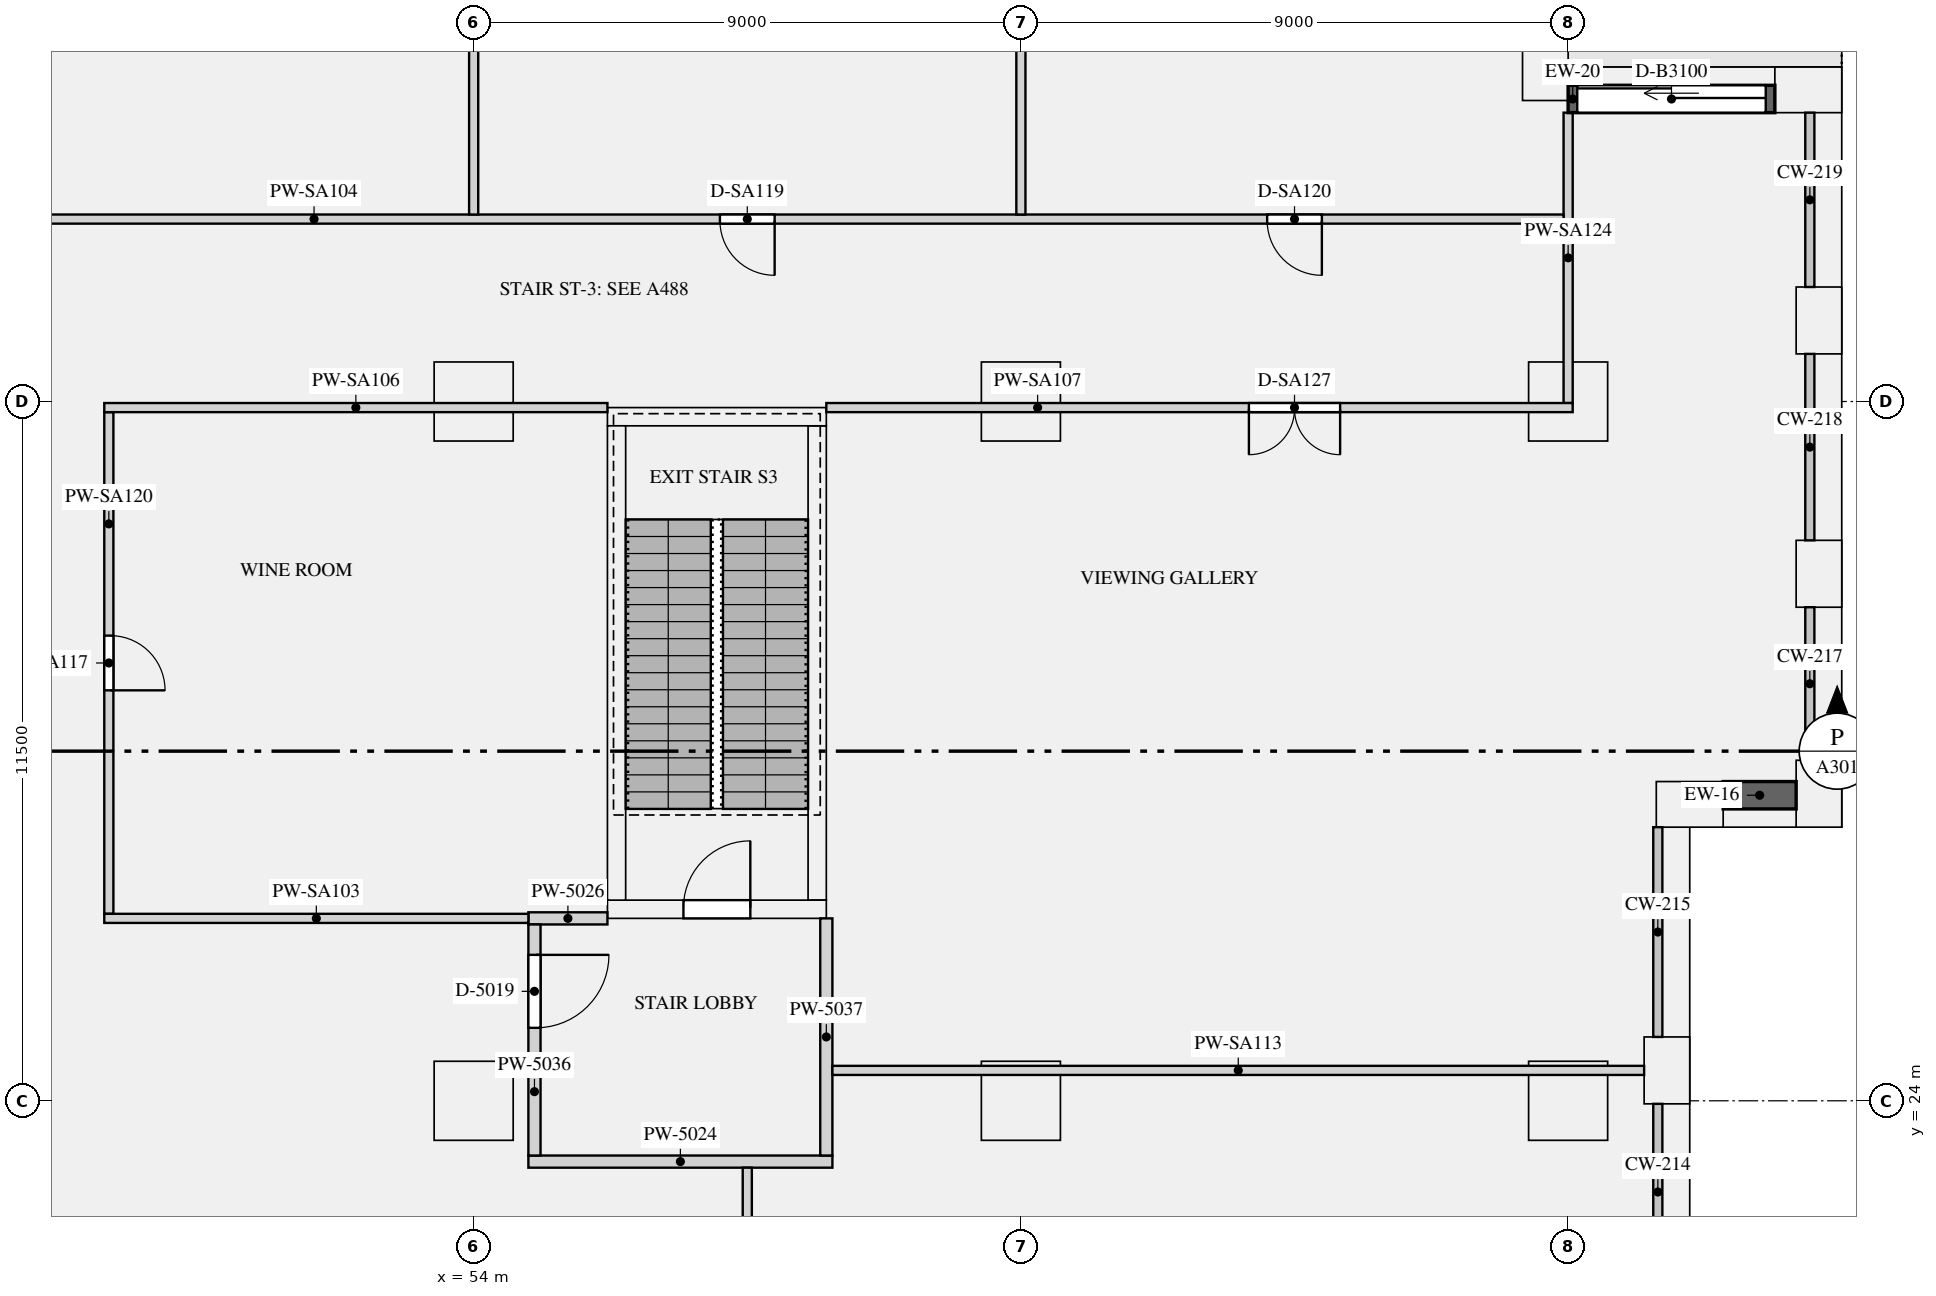
"""IFC4 building model, lengths in metres.
Left out: names, types, materials, properties, quantities, classifications, styles, units other than length and angle.
Written with IfcOpenShell. Run it as: python <this file> out.ifc"""

import sys

from ifc_helpers import new_model, si_unit, direction, frame, frame_2d, origin, origin_2d, place, context, subcontext, project, spatial, rectangle, extrude, element, fill, save


model = new_model("IFC4")
c1 = context("Model", 3, precision=1e-05, world=origin(), true_north=direction((0.0, 1.0)))
c2 = subcontext(c1, "Body", "Model", "MODEL_VIEW")
j1 = project(units=[si_unit("LENGTHUNIT", "METRE"), si_unit("PLANEANGLEUNIT", "RADIAN")], contexts=[c1])
p1 = place(None, origin())
s1 = spatial("IfcSite", under=j1, at=p1, CompositionType="ELEMENT")
p2 = place(p1, origin())
s2 = spatial("IfcBuilding", under=s1, at=p2, CompositionType="ELEMENT")
p3 = place(p2, frame((0.0, 0.0, 77.25)))
s3 = spatial("IfcBuildingStorey", under=s2, at=p3, CompositionType="ELEMENT", Elevation=77.25)
for number, where, z_axis, x_axis in (
    (1, (73.625, 24.5, 0.0), (0.0, 0.0, 1.0), (0.0, 1.0, 0.0)),
    (2, (74.0, 28.875, 0.0), (0.0, 0.0, 1.0), (1.0, 0.0, 0.0)),
    (3, (76.125, 29.05, 0.0), (0.0, 0.0, 1.0), (0.0, 1.0, 0.0)),
    (4, (76.125, 32.667, 0.0), (0.0, 0.0, 1.0), (0.0, 1.0, 0.0)),
    (5, (76.125, 36.833, 0.0), (0.0, 0.0, 1.0), (0.0, 1.0, 0.0)),
    (6, (75.95, 40.625, 0.0), (0.0, 0.0, 1.0), (-1.0, 0.0, 0.0)),
    (7, (71.625, 41.0, 0.0), (0.0, 0.0, 1.0), (0.0, 1.0, 0.0)),
):
    element("IfcColumn", number, at=place(p3, frame(where, z_axis=z_axis, x_axis=x_axis)), inside=s3, PredefinedType="USERDEFINED", context=c2, shape_type="SweptSolid", body=[
        extrude(rectangle(XDim=1.1, YDim=0.75, at=origin_2d()), origin(), (0.0, 0.0, 1.0), 6.3),
    ])
for number, where, z_axis, x_axis in (
    (8, (54.0, 24.0, 0.0), (0.0, 0.0, 1.0), (1.0, 0.0, 0.0)),
    (9, (63.0, 24.0, 0.0), (0.0, 0.0, 1.0), (1.0, 0.0, 0.0)),
    (10, (72.0, 24.0, 0.0), (0.0, 0.0, 1.0), (1.0, 0.0, 0.0)),
    (11, (54.0, 35.5, 0.0), (0.0, 0.0, 1.0), (1.0, 0.0, 0.0)),
    (12, (63.0, 35.5, 0.0), (0.0, 0.0, 1.0), (1.0, 0.0, 0.0)),
    (13, (72.0, 35.5, 0.0), (0.0, 0.0, 1.0), (1.0, 0.0, 0.0)),
):
    element("IfcColumn", number, at=place(p3, frame(where, z_axis=z_axis, x_axis=x_axis)), inside=s3, PredefinedType="COLUMN", context=c2, shape_type="SweptSolid", body=[
        extrude(rectangle(XDim=1.3, YDim=1.3, at=origin_2d()), origin(), (0.0, 0.0, 1.0), 6.3),
    ])
p4 = place(p3, frame((56.2, 27.15, 0.0), z_axis=(0.0, 0.0, 1.0), x_axis=(1.0, 0.0, 0.0)))
e14 = element("IfcWall", 14, at=p4, inside=s3, PredefinedType="SHEAR", context=c2, shape_type="SweptSolid", body=[
    extrude(rectangle(XDim=3.6, YDim=0.3, at=frame_2d((1.8, 0.0))), origin(), (0.0, 0.0, 1.0), 6.3),
])
p5 = place(p4, frame((1.25, 0.0, 0.0)))
e15 = element("IfcOpeningElement", 15, at=p5, cuts=e14, PredefinedType="OPENING", context=c2, shape_type="SweptSolid", body=[
    extrude(rectangle(XDim=1.1, YDim=2.1, at=frame_2d((0.55, 1.05))), frame((0.0, 0.16, 0.0), z_axis=(0.0, -1.0, 0.0), x_axis=(1.0, 0.0, 0.0)), (0.0, 0.0, 1.0), 0.32),
])
p6 = place(p3, frame((56.2, 35.25, 0.0), z_axis=(0.0, 0.0, 1.0), x_axis=(1.0, 0.0, 0.0)))
e16 = element("IfcWall", 16, at=p6, inside=s3, PredefinedType="SHEAR", context=c2, shape_type="SweptSolid", body=[
    extrude(rectangle(XDim=3.6, YDim=0.3, at=frame_2d((1.8, 0.0))), origin(), (0.0, 0.0, 1.0), 6.3),
])
for number, where, z_axis, x_axis in (
    (17, (56.35, 27.3, 0.0), (0.0, 0.0, 1.0), (0.0, 1.0, 0.0)),
    (18, (59.65, 27.3, 0.0), (0.0, 0.0, 1.0), (0.0, 1.0, 0.0)),
):
    element("IfcWall", number, at=place(p3, frame(where, z_axis=z_axis, x_axis=x_axis)), inside=s3, PredefinedType="SHEAR", context=c2, shape_type="SweptSolid", body=[
        extrude(rectangle(XDim=7.8, YDim=0.3, at=frame_2d((3.9, 0.0))), origin(), (0.0, 0.0, 1.0), 6.3),
    ])
p7 = place(p3, frame((74.55, 29.025, 0.9), z_axis=(0.0, 0.0, 1.0), x_axis=(1.0, 0.0, 0.0)))
e19 = element("IfcWall", 19, at=p7, inside=s3, PredefinedType="SOLIDWALL", context=c2, shape_type="SweptSolid", body=[
    extrude(rectangle(XDim=1.2, YDim=0.45, at=frame_2d((0.6, 0.0))), origin(), (0.0, 0.0, 1.0), 5.08),
])
p8 = place(p3, frame((75.4, 40.475, 0.0), z_axis=(0.0, 0.0, 1.0), x_axis=(-1.0, 0.0, 0.0)))
e20 = element("IfcWall", 20, at=p8, inside=s3, PredefinedType="SOLIDWALL", context=c2, shape_type="SweptSolid", body=[
    extrude(rectangle(XDim=3.4, YDim=0.45, at=frame_2d((1.7, 0.0))), origin(), (0.0, 0.0, 1.0), 5.98),
])
p9 = place(p8, frame((0.15, 0.0, 0.0)))
e21 = element("IfcOpeningElement", 21, at=p9, cuts=e20, PredefinedType="OPENING", context=c2, shape_type="SweptSolid", body=[
    extrude(rectangle(XDim=3.1, YDim=2.3, at=frame_2d((1.55, 1.15))), frame((0.0, 0.235, 0.0), z_axis=(0.0, -1.0, 0.0), x_axis=(1.0, 0.0, 0.0)), (0.0, 0.0, 1.0), 0.47),
])
p10 = place(p3, frame((54.9, 23.0, 0.0), z_axis=(0.0, 0.0, 1.0), x_axis=(1.0, 0.0, 0.0)))
e22 = element("IfcWall", 22, at=p10, inside=s3, PredefinedType="PARTITIONING", context=c2, shape_type="SweptSolid", body=[
    extrude(rectangle(XDim=5.0, YDim=0.2, at=frame_2d((2.5, 0.0))), origin(), (0.0, 0.0, 1.0), 5.98),
])
p11 = place(p3, frame((54.9, 27.0, 0.0), z_axis=(0.0, 0.0, 1.0), x_axis=(1.0, 0.0, 0.0)))
e23 = element("IfcWall", 23, at=p11, inside=s3, PredefinedType="PARTITIONING", context=c2, shape_type="SweptSolid", body=[
    extrude(rectangle(XDim=1.3, YDim=0.2, at=frame_2d((0.65, 0.0))), origin(), (0.0, 0.0, 1.0), 5.98),
])
p12 = place(p3, frame((55.0, 23.1, 0.0), z_axis=(0.0, 0.0, 1.0), x_axis=(0.0, 1.0, 0.0)))
e24 = element("IfcWall", 24, at=p12, inside=s3, PredefinedType="PARTITIONING", context=c2, shape_type="SweptSolid", body=[
    extrude(rectangle(XDim=3.8, YDim=0.2, at=frame_2d((1.9, 0.0))), origin(), (0.0, 0.0, 1.0), 5.98),
])
p13 = place(p12, frame((2.1, 0.0, 0.0)))
e25 = element("IfcOpeningElement", 25, at=p13, cuts=e24, PredefinedType="OPENING", context=c2, shape_type="SweptSolid", body=[
    extrude(rectangle(XDim=1.2, YDim=2.1, at=frame_2d((0.6, 1.05))), frame((0.0, 0.11, 0.0), z_axis=(0.0, -1.0, 0.0), x_axis=(1.0, 0.0, 0.0)), (0.0, 0.0, 1.0), 0.22),
])
p14 = place(p3, frame((59.8, 23.1, 0.0), z_axis=(0.0, 0.0, 1.0), x_axis=(0.0, 1.0, 0.0)))
e26 = element("IfcWall", 26, at=p14, inside=s3, PredefinedType="PARTITIONING", context=c2, shape_type="SweptSolid", body=[
    extrude(rectangle(XDim=3.9, YDim=0.2, at=frame_2d((1.95, 0.0))), origin(), (0.0, 0.0, 1.0), 5.98),
])
p15 = place(p3, frame((47.925, 27.0, 0.0), z_axis=(0.0, 0.0, 1.0), x_axis=(1.0, 0.0, 0.0)))
e27 = element("IfcWall", 27, at=p15, inside=s3, PredefinedType="PARTITIONING", context=c2, shape_type="SweptSolid", body=[
    extrude(rectangle(XDim=6.975, YDim=0.15, at=frame_2d((3.487, 0.0))), origin(), (0.0, 0.0, 1.0), 5.98),
])
p16 = place(p3, frame((13.425, 38.5, 0.0), z_axis=(0.0, 0.0, 1.0), x_axis=(1.0, 0.0, 0.0)))
e28 = element("IfcWall", 28, at=p16, inside=s3, PredefinedType="PARTITIONING", context=c2, shape_type="SweptSolid", body=[
    extrude(rectangle(XDim=58.5, YDim=0.15, at=frame_2d((29.25, 0.0))), origin(), (0.0, 0.0, 1.0), 5.98),
])
p17 = place(p16, frame((1.575, 0.0, 0.0)))
e29 = element("IfcOpeningElement", 29, at=p17, cuts=e28, PredefinedType="OPENING", context=c2, shape_type="SweptSolid", body=[
    extrude(rectangle(XDim=1.5, YDim=2.1, at=frame_2d((0.75, 1.05))), frame((0.0, 0.085, 0.0), z_axis=(0.0, -1.0, 0.0), x_axis=(1.0, 0.0, 0.0)), (0.0, 0.0, 1.0), 0.17),
])
p18 = place(p16, frame((6.825, 0.0, 0.0)))
e30 = element("IfcOpeningElement", 30, at=p18, cuts=e28, PredefinedType="OPENING", context=c2, shape_type="SweptSolid", body=[
    extrude(rectangle(XDim=1.5, YDim=2.1, at=frame_2d((0.75, 1.05))), frame((0.0, 0.085, 0.0), z_axis=(0.0, -1.0, 0.0), x_axis=(1.0, 0.0, 0.0)), (0.0, 0.0, 1.0), 0.17),
])
p19 = place(p16, frame((17.625, 0.0, 0.0)))
e31 = element("IfcOpeningElement", 31, at=p19, cuts=e28, PredefinedType="OPENING", context=c2, shape_type="SweptSolid", body=[
    extrude(rectangle(XDim=0.9, YDim=2.1, at=frame_2d((0.45, 1.05))), frame((0.0, 0.085, 0.0), z_axis=(0.0, -1.0, 0.0), x_axis=(1.0, 0.0, 0.0)), (0.0, 0.0, 1.0), 0.17),
])
p20 = place(p16, frame((24.375, 0.0, 0.0)))
e32 = element("IfcOpeningElement", 32, at=p20, cuts=e28, PredefinedType="OPENING", context=c2, shape_type="SweptSolid", body=[
    extrude(rectangle(XDim=0.9, YDim=2.1, at=frame_2d((0.45, 1.05))), frame((0.0, 0.085, 0.0), z_axis=(0.0, -1.0, 0.0), x_axis=(1.0, 0.0, 0.0)), (0.0, 0.0, 1.0), 0.17),
])
p21 = place(p16, frame((30.375, 0.0, 0.0)))
e33 = element("IfcOpeningElement", 33, at=p21, cuts=e28, PredefinedType="OPENING", context=c2, shape_type="SweptSolid", body=[
    extrude(rectangle(XDim=0.9, YDim=2.1, at=frame_2d((0.45, 1.05))), frame((0.0, 0.085, 0.0), z_axis=(0.0, -1.0, 0.0), x_axis=(1.0, 0.0, 0.0)), (0.0, 0.0, 1.0), 0.17),
])
p22 = place(p16, frame((44.625, 0.0, 0.0)))
e34 = element("IfcOpeningElement", 34, at=p22, cuts=e28, PredefinedType="OPENING", context=c2, shape_type="SweptSolid", body=[
    extrude(rectangle(XDim=0.9, YDim=2.1, at=frame_2d((0.45, 1.05))), frame((0.0, 0.085, 0.0), z_axis=(0.0, -1.0, 0.0), x_axis=(1.0, 0.0, 0.0)), (0.0, 0.0, 1.0), 0.17),
])
p23 = place(p16, frame((53.625, 0.0, 0.0)))
e35 = element("IfcOpeningElement", 35, at=p23, cuts=e28, PredefinedType="OPENING", context=c2, shape_type="SweptSolid", body=[
    extrude(rectangle(XDim=0.9, YDim=2.1, at=frame_2d((0.45, 1.05))), frame((0.0, 0.085, 0.0), z_axis=(0.0, -1.0, 0.0), x_axis=(1.0, 0.0, 0.0)), (0.0, 0.0, 1.0), 0.17),
])
p24 = place(p3, frame((47.925, 35.4, 0.0), z_axis=(0.0, 0.0, 1.0), x_axis=(1.0, 0.0, 0.0)))
e36 = element("IfcWall", 36, at=p24, inside=s3, PredefinedType="PARTITIONING", context=c2, shape_type="SweptSolid", body=[
    extrude(rectangle(XDim=8.275, YDim=0.15, at=frame_2d((4.137, 0.0))), origin(), (0.0, 0.0, 1.0), 5.98),
])
p25 = place(p3, frame((59.8, 35.4, 0.0), z_axis=(0.0, 0.0, 1.0), x_axis=(1.0, 0.0, 0.0)))
e37 = element("IfcWall", 37, at=p25, inside=s3, PredefinedType="PARTITIONING", context=c2, shape_type="SweptSolid", body=[
    extrude(rectangle(XDim=12.275, YDim=0.15, at=frame_2d((6.137, 0.0))), origin(), (0.0, 0.0, 1.0), 5.98),
])
p26 = place(p25, frame((6.95, 0.0, 0.0)))
e38 = element("IfcOpeningElement", 38, at=p26, cuts=e37, PredefinedType="OPENING", context=c2, shape_type="SweptSolid", body=[
    extrude(rectangle(XDim=1.5, YDim=2.1, at=frame_2d((0.75, 1.05))), frame((0.0, 0.085, 0.0), z_axis=(0.0, -1.0, 0.0), x_axis=(1.0, 0.0, 0.0)), (0.0, 0.0, 1.0), 0.17),
])
p27 = place(p3, frame((59.9, 24.5, 0.0), z_axis=(0.0, 0.0, 1.0), x_axis=(1.0, 0.0, 0.0)))
e39 = element("IfcWall", 39, at=p27, inside=s3, PredefinedType="PARTITIONING", context=c2, shape_type="SweptSolid", body=[
    extrude(rectangle(XDim=13.35, YDim=0.15, at=frame_2d((6.675, 0.0))), origin(), (0.0, 0.0, 1.0), 5.98),
])
p28 = place(p3, frame((48.0, 27.075, 0.0), z_axis=(0.0, 0.0, 1.0), x_axis=(0.0, 1.0, 0.0)))
e40 = element("IfcWall", 40, at=p28, inside=s3, PredefinedType="PARTITIONING", context=c2, shape_type="SweptSolid", body=[
    extrude(rectangle(XDim=8.25, YDim=0.15, at=frame_2d((4.125, 0.0))), origin(), (0.0, 0.0, 1.0), 5.98),
])
p29 = place(p28, frame((3.675, 0.0, 0.0)))
e41 = element("IfcOpeningElement", 41, at=p29, cuts=e40, PredefinedType="OPENING", context=c2, shape_type="SweptSolid", body=[
    extrude(rectangle(XDim=0.9, YDim=2.1, at=frame_2d((0.45, 1.05))), frame((0.0, 0.085, 0.0), z_axis=(0.0, -1.0, 0.0), x_axis=(1.0, 0.0, 0.0)), (0.0, 0.0, 1.0), 0.17),
])
p30 = place(p3, frame((72.0, 35.475, 0.0), z_axis=(0.0, 0.0, 1.0), x_axis=(0.0, 1.0, 0.0)))
e42 = element("IfcWall", 42, at=p30, inside=s3, PredefinedType="PARTITIONING", context=c2, shape_type="SweptSolid", body=[
    extrude(rectangle(XDim=4.775, YDim=0.15, at=frame_2d((2.387, 0.0))), origin(), (0.0, 0.0, 1.0), 5.98),
])
p31 = place(p3, frame((58.5, 8.575, 0.0), z_axis=(0.0, 0.0, 1.0), x_axis=(0.0, 1.0, 0.0)))
e43 = element("IfcWall", 43, at=p31, inside=s3, PredefinedType="PARTITIONING", context=c2, shape_type="SweptSolid", body=[
    extrude(rectangle(XDim=14.325, YDim=0.15, at=frame_2d((7.163, 0.0))), origin(), (0.0, 0.0, 1.0), 5.98),
])
p32 = place(p31, frame((8.45, 0.0, 0.0)))
e44 = element("IfcOpeningElement", 44, at=p32, cuts=e43, PredefinedType="OPENING", context=c2, shape_type="SweptSolid", body=[
    extrude(rectangle(XDim=1.5, YDim=2.1, at=frame_2d((0.75, 1.05))), frame((0.0, 0.085, 0.0), z_axis=(0.0, -1.0, 0.0), x_axis=(1.0, 0.0, 0.0)), (0.0, 0.0, 1.0), 0.17),
])
for number, where, z_axis, x_axis in (
    (45, (54.0, 38.575, 0.0), (0.0, 0.0, 1.0), (0.0, 1.0, 0.0)),
    (46, (63.0, 38.575, 0.0), (0.0, 0.0, 1.0), (0.0, 1.0, 0.0)),
):
    element("IfcWall", number, at=place(p3, frame(where, z_axis=z_axis, x_axis=x_axis)), inside=s3, PredefinedType="PARTITIONING", context=c2, shape_type="SweptSolid", body=[
        extrude(rectangle(XDim=6.175, YDim=0.15, at=frame_2d((3.087, 0.0))), origin(), (0.0, 0.0, 1.0), 5.98),
    ])
p33 = place(p9, origin())
e47 = element("IfcDoor", 47, at=p33, inside=s3, OperationType="SLIDING_TO_LEFT", PredefinedType="DOOR", context=c2, shape_type="SweptSolid", body=[
    extrude(rectangle(XDim=3.1, YDim=2.3, at=frame_2d((1.55, 1.15))), frame((0.0, -0.07, 0.0), z_axis=(0.0, -1.0, 0.0), x_axis=(1.0, 0.0, 0.0)), (0.0, 0.0, 1.0), 0.05),
])
fill(e21, e47)
p34 = place(p5, origin())
e48 = element("IfcDoor", 48, at=p34, inside=s3, OperationType="SINGLE_SWING_RIGHT", PredefinedType="DOOR", context=c2, shape_type="SweptSolid", body=[
    extrude(rectangle(XDim=1.1, YDim=2.1, at=frame_2d((0.55, 1.05))), frame((0.0, 0.025, 0.0), z_axis=(0.0, -1.0, 0.0), x_axis=(1.0, 0.0, 0.0)), (0.0, 0.0, 1.0), 0.05),
])
fill(e15, e48)
p35 = place(p13, frame((1.2, 0.0, 0.0), z_axis=(0.0, 0.0, 1.0), x_axis=(-1.0, 0.0, 0.0)))
e49 = element("IfcDoor", 49, at=p35, inside=s3, OperationType="SINGLE_SWING_LEFT", PredefinedType="DOOR", context=c2, shape_type="SweptSolid", body=[
    extrude(rectangle(XDim=1.2, YDim=2.1, at=frame_2d((0.6, 1.05))), frame((0.0, 0.025, 0.0), z_axis=(0.0, -1.0, 0.0), x_axis=(1.0, 0.0, 0.0)), (0.0, 0.0, 1.0), 0.05),
])
fill(e25, e49)
p36 = place(p29, frame((0.9, 0.0, 0.0), z_axis=(0.0, 0.0, 1.0), x_axis=(-1.0, 0.0, 0.0)))
e50 = element("IfcDoor", 50, at=p36, inside=s3, OperationType="SINGLE_SWING_RIGHT", PredefinedType="DOOR", context=c2, shape_type="SweptSolid", body=[
    extrude(rectangle(XDim=0.9, YDim=2.1, at=frame_2d((0.45, 1.05))), frame((0.0, 0.025, 0.0), z_axis=(0.0, -1.0, 0.0), x_axis=(1.0, 0.0, 0.0)), (0.0, 0.0, 1.0), 0.05),
])
fill(e41, e50)
p37 = place(p22, frame((0.9, 0.0, 0.0), z_axis=(0.0, 0.0, 1.0), x_axis=(-1.0, 0.0, 0.0)))
e51 = element("IfcDoor", 51, at=p37, inside=s3, OperationType="SINGLE_SWING_LEFT", PredefinedType="DOOR", context=c2, shape_type="SweptSolid", body=[
    extrude(rectangle(XDim=0.9, YDim=2.1, at=frame_2d((0.45, 1.05))), frame((0.0, 0.025, 0.0), z_axis=(0.0, -1.0, 0.0), x_axis=(1.0, 0.0, 0.0)), (0.0, 0.0, 1.0), 0.05),
])
fill(e34, e51)
p38 = place(p23, frame((0.9, 0.0, 0.0), z_axis=(0.0, 0.0, 1.0), x_axis=(-1.0, 0.0, 0.0)))
e52 = element("IfcDoor", 52, at=p38, inside=s3, OperationType="SINGLE_SWING_LEFT", PredefinedType="DOOR", context=c2, shape_type="SweptSolid", body=[
    extrude(rectangle(XDim=0.9, YDim=2.1, at=frame_2d((0.45, 1.05))), frame((0.0, 0.025, 0.0), z_axis=(0.0, -1.0, 0.0), x_axis=(1.0, 0.0, 0.0)), (0.0, 0.0, 1.0), 0.05),
])
fill(e35, e52)
p39 = place(p26, frame((1.5, 0.0, 0.0), z_axis=(0.0, 0.0, 1.0), x_axis=(-1.0, 0.0, 0.0)))
e53 = element("IfcDoor", 53, at=p39, inside=s3, OperationType="DOUBLE_DOOR_SINGLE_SWING", PredefinedType="DOOR", context=c2, shape_type="SweptSolid", body=[
    extrude(rectangle(XDim=1.5, YDim=2.1, at=frame_2d((0.75, 1.05))), frame((0.0, 0.025, 0.0), z_axis=(0.0, -1.0, 0.0), x_axis=(1.0, 0.0, 0.0)), (0.0, 0.0, 1.0), 0.05),
])
fill(e38, e53)
save(model, sys.argv[1])
